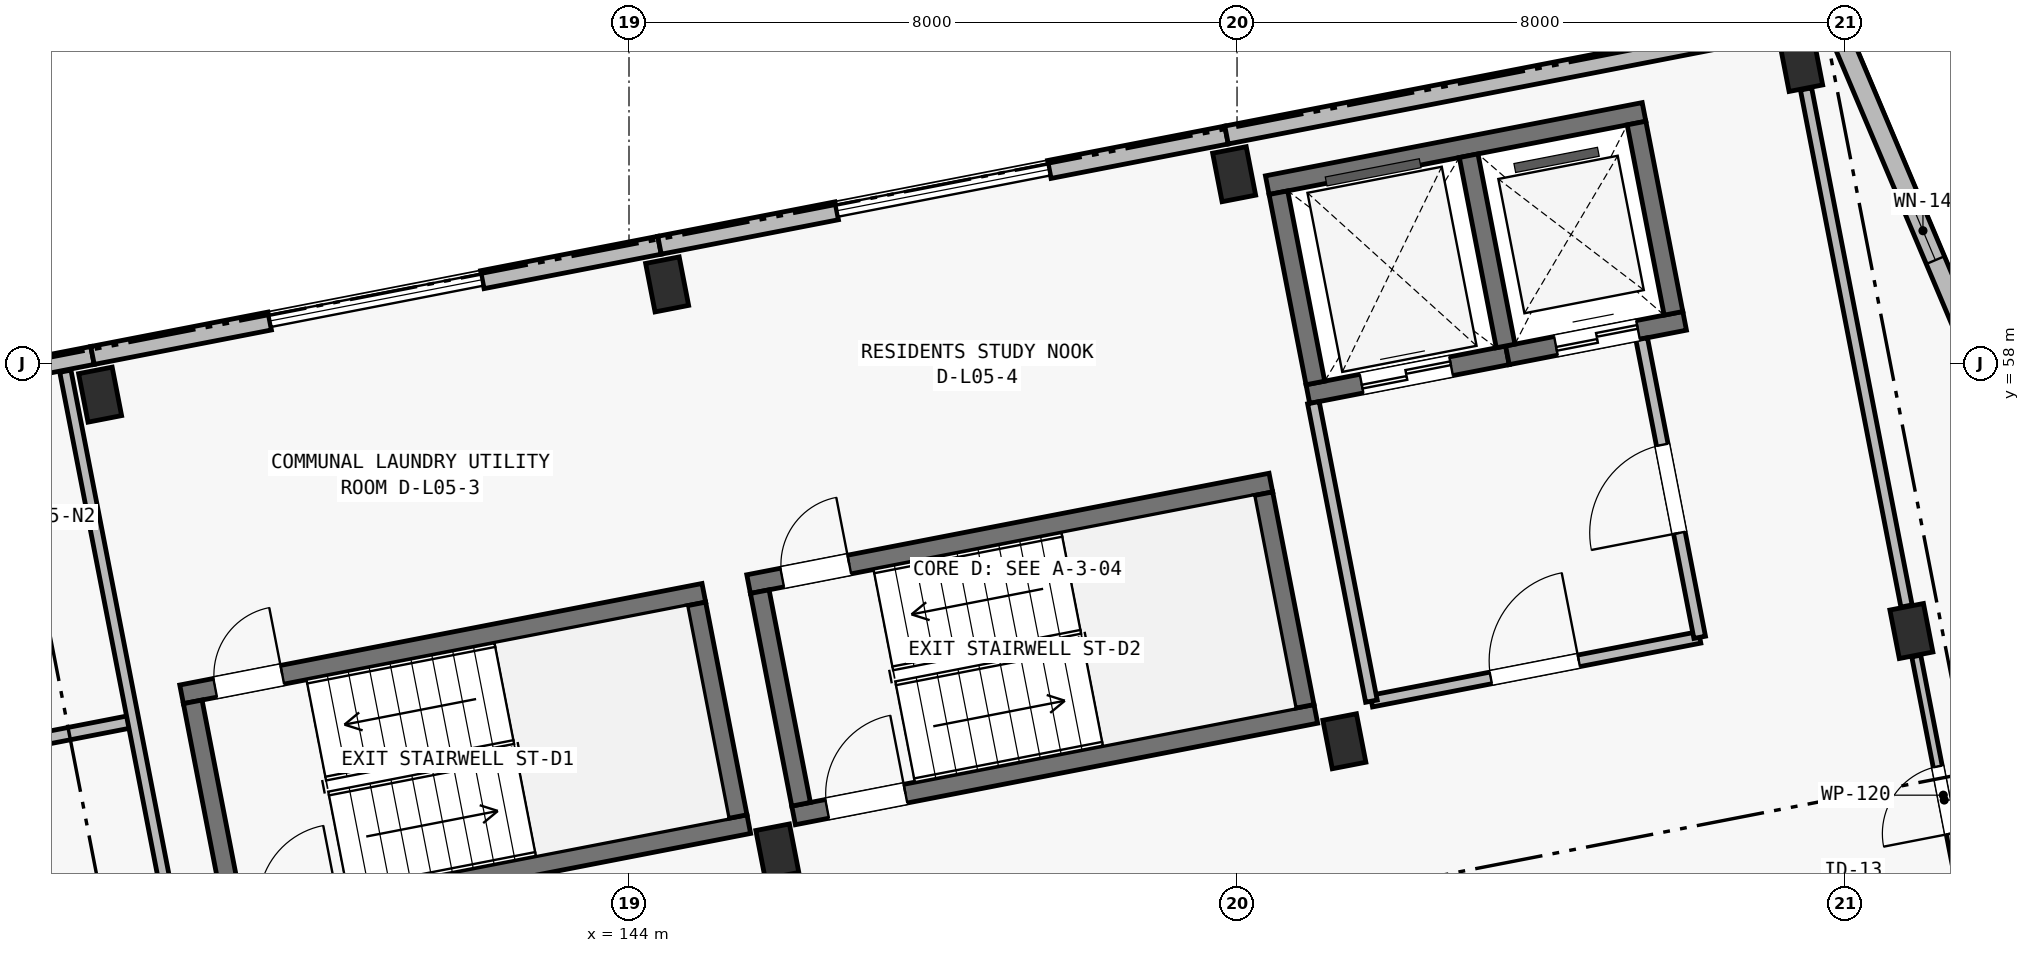
"""IFC4 building model, lengths in metres.
Left out: names, types, materials, properties, quantities, classifications, styles, units other than length and angle.
Written with IfcOpenShell. Run it as: python <this file> out.ifc"""

import sys

from ifc_helpers import new_model, si_unit, direction, frame, frame_2d, origin, origin_2d, place, context, subcontext, project, spatial, rectangle, extrude, element, fill, save


model = new_model("IFC4")
c1 = context("Model", 3, precision=1e-05, world=origin(), true_north=direction((0.0, 1.0)))
c2 = subcontext(c1, "Body", "Model", "MODEL_VIEW")
j1 = project(units=[si_unit("LENGTHUNIT", "METRE"), si_unit("PLANEANGLEUNIT", "RADIAN")], contexts=[c1])
p1 = place(None, origin())
s1 = spatial("IfcSite", under=j1, at=p1, CompositionType="ELEMENT")
p2 = place(p1, origin())
s2 = spatial("IfcBuilding", under=s1, at=p2, CompositionType="ELEMENT")
p3 = place(p2, frame((0.0, 0.0, 18.15)))
s3 = spatial("IfcBuildingStorey", under=s2, at=p3, CompositionType="ELEMENT", Elevation=18.15)
for number, where, z_axis, x_axis in (
    (1, (137.041, 57.59, 0.0), (0.0, 0.0, 1.0), (0.982, 0.191, 0.0)),
    (2, (145.952, 51.58, 0.0), (0.0, 0.0, 1.0), (0.982, 0.191, 0.0)),
    (3, (144.502, 59.041, 0.0), (0.0, 0.0, 1.0), (0.982, 0.191, 0.0)),
    (4, (153.412, 53.03, 0.0), (0.0, 0.0, 1.0), (0.982, 0.191, 0.0)),
    (5, (151.962, 60.491, 0.0), (0.0, 0.0, 1.0), (0.982, 0.191, 0.0)),
    (6, (160.873, 54.48, 0.0), (0.0, 0.0, 1.0), (0.982, 0.191, 0.0)),
    (7, (159.422, 61.941, 0.0), (0.0, 0.0, 1.0), (0.982, 0.191, 0.0)),
):
    element("IfcColumn", number, at=place(p3, frame(where, z_axis=z_axis, x_axis=x_axis)), inside=s3, PredefinedType="COLUMN", context=c2, shape_type="SweptSolid", body=[
        extrude(rectangle(XDim=0.45, YDim=0.65, at=origin_2d()), origin(), (0.0, 0.0, 1.0), 3.25),
    ])
p4 = place(p3, frame((152.397, 60.346, 0.0), z_axis=(0.0, 0.0, 1.0), x_axis=(0.981635261308, 0.190767433692, 0.0)))
e8 = element("IfcWall", 8, at=p4, inside=s3, PredefinedType="SHEAR", context=c2, shape_type="SweptSolid", body=[
    extrude(rectangle(XDim=5.05, YDim=0.25, at=frame_2d((2.525, 0.0))), origin(), (0.0, 0.0, 1.0), 3.25),
])
p5 = place(p3, frame((152.932, 57.598, 0.0), z_axis=(0.0, 0.0, 1.0), x_axis=(0.981636759622, 0.190759723627, 0.0)))
e9 = element("IfcWall", 9, at=p5, inside=s3, PredefinedType="SHEAR", context=c2, shape_type="SweptSolid", body=[
    extrude(rectangle(XDim=2.675, YDim=0.25, at=frame_2d((1.337, 0.0))), origin(), (0.0, 0.0, 1.0), 3.25),
])
p6 = place(p5, frame((0.72, 0.0, 0.0)))
e10 = element("IfcOpeningElement", 10, at=p6, cuts=e9, PredefinedType="OPENING", context=c2, shape_type="SweptSolid", body=[
    extrude(rectangle(XDim=1.2, YDim=2.2, at=frame_2d((0.6, 1.1))), frame((0.0, 0.14, 0.0), z_axis=(0.0, -1.0, 0.0), x_axis=(1.0, 0.0, 0.0)), (0.0, 0.0, 1.0), 0.28),
])
p7 = place(p3, frame((155.558, 58.108, 0.0), z_axis=(0.0, 0.0, 1.0), x_axis=(0.981633573872, 0.190776116556, 0.0)))
e11 = element("IfcWall", 11, at=p7, inside=s3, PredefinedType="SHEAR", context=c2, shape_type="SweptSolid", body=[
    extrude(rectangle(XDim=2.375, YDim=0.25, at=frame_2d((1.188, 0.0))), origin(), (0.0, 0.0, 1.0), 3.25),
])
p8 = place(p7, frame((0.65, 0.0, 0.0)))
e12 = element("IfcOpeningElement", 12, at=p8, cuts=e11, PredefinedType="OPENING", context=c2, shape_type="SweptSolid", body=[
    extrude(rectangle(XDim=1.1, YDim=2.15, at=frame_2d((0.55, 1.075))), frame((0.0, 0.14, 0.0), z_axis=(0.0, -1.0, 0.0), x_axis=(1.0, 0.0, 0.0)), (0.0, 0.0, 1.0), 0.28),
])
for number, where, z_axis, x_axis in (
    (13, (153.031, 57.744, 0.0), (0.0, 0.0, 1.0), (-0.191, 0.982, 0.0)),
    (14, (155.534, 58.231, 0.0), (0.0, 0.0, 1.0), (-0.191, 0.982, 0.0)),
    (15, (157.742, 58.66, 0.0), (0.0, 0.0, 1.0), (-0.191, 0.982, 0.0)),
):
    element("IfcWall", number, at=place(p3, frame(where, z_axis=z_axis, x_axis=x_axis)), inside=s3, PredefinedType="SHEAR", context=c2, shape_type="SweptSolid", body=[
        extrude(rectangle(XDim=2.55, YDim=0.25, at=frame_2d((1.275, 0.0))), origin(), (0.0, 0.0, 1.0), 3.25),
    ])
p9 = place(p3, frame((138.113, 53.647, 0.0), z_axis=(0.0, 0.0, 1.0), x_axis=(0.981626097708, 0.19081458094, 0.0)))
e16 = element("IfcWall", 16, at=p9, inside=s3, PredefinedType="SHEAR", context=c2, shape_type="SweptSolid", body=[
    extrude(rectangle(XDim=7.0, YDim=0.25, at=frame_2d((3.5, 0.0))), origin(), (0.0, 0.0, 1.0), 3.25),
])
p10 = place(p9, frame((0.45, 0.0, 0.0)))
e17 = element("IfcOpeningElement", 17, at=p10, cuts=e16, PredefinedType="OPENING", context=c2, shape_type="SweptSolid", body=[
    extrude(rectangle(XDim=0.9, YDim=2.1, at=frame_2d((0.45, 1.05))), frame((0.0, 0.14, 0.0), z_axis=(0.0, -1.0, 0.0), x_axis=(1.0, 0.0, 0.0)), (0.0, 0.0, 1.0), 0.28),
])
p11 = place(p3, frame((138.705, 50.604, 0.0), z_axis=(0.0, 0.0, 1.0), x_axis=(0.981626097708, 0.19081458094, 0.0)))
e18 = element("IfcWall", 18, at=p11, inside=s3, PredefinedType="SHEAR", context=c2, shape_type="SweptSolid", body=[
    extrude(rectangle(XDim=7.0, YDim=0.25, at=frame_2d((3.5, 0.0))), origin(), (0.0, 0.0, 1.0), 3.25),
])
p12 = place(p11, frame((0.45, 0.0, 0.0)))
e19 = element("IfcOpeningElement", 19, at=p12, cuts=e18, PredefinedType="OPENING", context=c2, shape_type="SweptSolid", body=[
    extrude(rectangle(XDim=1.05, YDim=2.15, at=frame_2d((0.525, 1.075))), frame((0.0, 0.14, 0.0), z_axis=(0.0, -1.0, 0.0), x_axis=(1.0, 0.0, 0.0)), (0.0, 0.0, 1.0), 0.28),
])
p13 = place(p3, frame((138.804, 50.751, 0.0), z_axis=(0.0, 0.0, 1.0), x_axis=(-0.190858194834, 0.981617618762, 0.0)))
e20 = element("IfcWall", 20, at=p13, inside=s3, PredefinedType="SHEAR", context=c2, shape_type="SweptSolid", body=[
    extrude(rectangle(XDim=2.85, YDim=0.25, at=frame_2d((1.425, 0.0))), origin(), (0.0, 0.0, 1.0), 3.25),
])
p14 = place(p3, frame((145.43, 52.039, 0.0), z_axis=(0.0, 0.0, 1.0), x_axis=(-0.190842147128, 0.981620738819, 0.0)))
e21 = element("IfcWall", 21, at=p14, inside=s3, PredefinedType="SHEAR", context=c2, shape_type="SweptSolid", body=[
    extrude(rectangle(XDim=2.85, YDim=0.25, at=frame_2d((1.425, 0.0))), origin(), (0.0, 0.0, 1.0), 3.25),
])
p15 = place(p3, frame((145.574, 55.098, 0.0), z_axis=(0.0, 0.0, 1.0), x_axis=(0.981626097708, 0.19081458094, 0.0)))
e22 = element("IfcWall", 22, at=p15, inside=s3, PredefinedType="SHEAR", context=c2, shape_type="SweptSolid", body=[
    extrude(rectangle(XDim=7.0, YDim=0.25, at=frame_2d((3.5, 0.0))), origin(), (0.0, 0.0, 1.0), 3.25),
])
p16 = place(p15, frame((0.45, 0.0, 0.0)))
e23 = element("IfcOpeningElement", 23, at=p16, cuts=e22, PredefinedType="OPENING", context=c2, shape_type="SweptSolid", body=[
    extrude(rectangle(XDim=0.9, YDim=2.1, at=frame_2d((0.45, 1.05))), frame((0.0, 0.14, 0.0), z_axis=(0.0, -1.0, 0.0), x_axis=(1.0, 0.0, 0.0)), (0.0, 0.0, 1.0), 0.28),
])
p17 = place(p3, frame((146.165, 52.054, 0.0), z_axis=(0.0, 0.0, 1.0), x_axis=(0.981627367538, 0.190808048312, 0.0)))
e24 = element("IfcWall", 24, at=p17, inside=s3, PredefinedType="SHEAR", context=c2, shape_type="SweptSolid", body=[
    extrude(rectangle(XDim=7.0, YDim=0.25, at=frame_2d((3.5, 0.0))), origin(), (0.0, 0.0, 1.0), 3.25),
])
p18 = place(p17, frame((0.45, 0.0, 0.0)))
e25 = element("IfcOpeningElement", 25, at=p18, cuts=e24, PredefinedType="OPENING", context=c2, shape_type="SweptSolid", body=[
    extrude(rectangle(XDim=1.05, YDim=2.15, at=frame_2d((0.525, 1.075))), frame((0.0, 0.14, 0.0), z_axis=(0.0, -1.0, 0.0), x_axis=(1.0, 0.0, 0.0)), (0.0, 0.0, 1.0), 0.28),
])
for number, where, z_axis, x_axis in (
    (26, (146.264, 52.201, 0.0), (0.0, 0.0, 1.0), (-0.191, 0.982, 0.0)),
    (27, (152.89, 53.489, 0.0), (0.0, 0.0, 1.0), (-0.191, 0.982, 0.0)),
):
    element("IfcWall", number, at=place(p3, frame(where, z_axis=z_axis, x_axis=x_axis)), inside=s3, PredefinedType="SHEAR", context=c2, shape_type="SweptSolid", body=[
        extrude(rectangle(XDim=2.85, YDim=0.25, at=frame_2d((1.425, 0.0))), origin(), (0.0, 0.0, 1.0), 3.25),
    ])
p19 = place(p3, frame((129.481, 56.656, 0.0), z_axis=(0.0, 0.0, 1.0), x_axis=(0.981626422232, 0.190812911449, 0.0)))
e28 = element("IfcWall", 28, at=p19, inside=s3, PredefinedType="SOLIDWALL", context=c2, shape_type="SweptSolid", body=[
    extrude(rectangle(XDim=7.6, YDim=0.24, at=frame_2d((3.8, 0.0))), origin(), (0.0, 0.0, 1.0), 3.0),
])
p20 = place(p19, frame((0.934, 0.0, 0.5)))
e29 = element("IfcOpeningElement", 29, at=p20, cuts=e28, PredefinedType="OPENING", context=c2, shape_type="SweptSolid", body=[
    extrude(rectangle(XDim=0.62, YDim=2.28, at=frame_2d((0.31, 1.14))), frame((0.0, 0.135, 0.0), z_axis=(0.0, -1.0, 0.0), x_axis=(1.0, 0.0, 0.0)), (0.0, 0.0, 1.0), 0.27),
])
p21 = place(p19, frame((5.506, 0.0, 0.44)))
e30 = element("IfcOpeningElement", 30, at=p21, cuts=e28, PredefinedType="OPENING", context=c2, shape_type="SweptSolid", body=[
    extrude(rectangle(XDim=0.7, YDim=2.36, at=frame_2d((0.35, 1.18))), frame((0.0, 0.135, 0.0), z_axis=(0.0, -1.0, 0.0), x_axis=(1.0, 0.0, 0.0)), (0.0, 0.0, 1.0), 0.27),
])
for number, where, z_axis, x_axis in (
    (31, (136.941, 58.106, 0.0), (0.0, 0.0, 1.0), (0.982, 0.191, 0.0)),
    (32, (142.07, 59.103, 0.0), (0.0, 0.0, 1.0), (0.982, 0.191, 0.0)),
):
    element("IfcWall", number, at=place(p3, frame(where, z_axis=z_axis, x_axis=x_axis)), inside=s3, PredefinedType="SOLIDWALL", context=c2, shape_type="SweptSolid", body=[
        extrude(rectangle(XDim=2.375, YDim=0.24, at=frame_2d((1.188, 0.0))), origin(), (0.0, 0.0, 1.0), 3.0),
    ])
p22 = place(p3, frame((144.401, 59.556, 0.0), z_axis=(0.0, 0.0, 1.0), x_axis=(0.981633573872, 0.190776116556, 0.0)))
e33 = element("IfcWall", 33, at=p22, inside=s3, PredefinedType="SOLIDWALL", context=c2, shape_type="SweptSolid", body=[
    extrude(rectangle(XDim=2.375, YDim=0.24, at=frame_2d((1.188, 0.0))), origin(), (0.0, 0.0, 1.0), 3.0),
])
p23 = place(p3, frame((149.531, 60.553, 0.0), z_axis=(0.0, 0.0, 1.0), x_axis=(0.98161057432, 0.190894422087, 0.0)))
e34 = element("IfcWall", 34, at=p23, inside=s3, PredefinedType="SOLIDWALL", context=c2, shape_type="SweptSolid", body=[
    extrude(rectangle(XDim=2.375, YDim=0.24, at=frame_2d((1.188, 0.0))), origin(), (0.0, 0.0, 1.0), 3.0),
])
p24 = place(p3, frame((151.862, 61.006, 0.0), z_axis=(0.0, 0.0, 1.0), x_axis=(0.981627273155, 0.190808533872, 0.0)))
e35 = element("IfcWall", 35, at=p24, inside=s3, PredefinedType="SOLIDWALL", context=c2, shape_type="SweptSolid", body=[
    extrude(rectangle(XDim=8.125, YDim=0.24, at=frame_2d((4.062, 0.0))), origin(), (0.0, 0.0, 1.0), 3.0),
])
p25 = place(p3, frame((159.837, 62.556, 0.0), z_axis=(0.0, 0.0, 1.0), x_axis=(0.389225507936, -0.921142499276, 0.0)))
e36 = element("IfcWall", 36, at=p25, inside=s3, PredefinedType="SOLIDWALL", context=c2, shape_type="SweptSolid", body=[
    extrude(rectangle(XDim=17.91, YDim=0.26, at=frame_2d((8.955, 0.0))), origin(), (0.0, 0.0, 1.0), 3.0),
])
p26 = place(p25, frame((2.63, 0.0, 0.52)))
e37 = element("IfcOpeningElement", 37, at=p26, cuts=e36, PredefinedType="OPENING", context=c2, shape_type="SweptSolid", body=[
    extrude(rectangle(XDim=0.84, YDim=2.28, at=frame_2d((0.42, 1.14))), frame((0.0, 0.145, 0.0), z_axis=(0.0, -1.0, 0.0), x_axis=(1.0, 0.0, 0.0)), (0.0, 0.0, 1.0), 0.29),
])
p27 = place(p25, frame((14.24, 0.0, 0.45)))
e38 = element("IfcOpeningElement", 38, at=p27, cuts=e36, PredefinedType="OPENING", context=c2, shape_type="SweptSolid", body=[
    extrude(rectangle(XDim=0.68, YDim=2.24, at=frame_2d((0.34, 1.12))), frame((0.0, 0.145, 0.0), z_axis=(0.0, -1.0, 0.0), x_axis=(1.0, 0.0, 0.0)), (0.0, 0.0, 1.0), 0.29),
])
p28 = place(p3, frame((153.768, 53.558, 0.0), z_axis=(0.0, 0.0, 1.0), x_axis=(0.981624918225, 0.190820648566, 0.0)))
e39 = element("IfcWall", 39, at=p28, inside=s3, PredefinedType="PARTITIONING", context=c2, shape_type="SweptSolid", body=[
    extrude(rectangle(XDim=4.4, YDim=0.155, at=frame_2d((2.2, 0.0))), origin(), (0.0, 0.0, 1.0), 2.97),
])
p29 = place(p28, frame((1.6, 0.0, 0.0)))
e40 = element("IfcOpeningElement", 40, at=p29, cuts=e39, PredefinedType="OPENING", context=c2, shape_type="SweptSolid", body=[
    extrude(rectangle(XDim=1.18, YDim=2.15, at=frame_2d((0.59, 1.075))), frame((0.0, 0.093, 0.0), z_axis=(0.0, -1.0, 0.0), x_axis=(1.0, 0.0, 0.0)), (0.0, 0.0, 1.0), 0.185),
])
p30 = place(p3, frame((153.768, 53.558, 0.0), z_axis=(0.0, 0.0, 1.0), x_axis=(-0.19085495634, 0.981618248425, 0.0)))
e41 = element("IfcWall", 41, at=p30, inside=s3, PredefinedType="PARTITIONING", context=c2, shape_type="SweptSolid", body=[
    extrude(rectangle(XDim=4.0, YDim=0.155, at=frame_2d((2.0, 0.0))), origin(), (0.0, 0.0, 1.0), 2.97),
])
p31 = place(p3, frame((158.087, 54.397, 0.0), z_axis=(0.0, 0.0, 1.0), x_axis=(-0.190796144009, 0.981629681413, 0.0)))
e42 = element("IfcWall", 42, at=p31, inside=s3, PredefinedType="PARTITIONING", context=c2, shape_type="SweptSolid", body=[
    extrude(rectangle(XDim=4.0, YDim=0.155, at=frame_2d((2.0, 0.0))), origin(), (0.0, 0.0, 1.0), 2.97),
])
p32 = place(p31, frame((1.4, 0.0, 0.0)))
e43 = element("IfcOpeningElement", 43, at=p32, cuts=e42, PredefinedType="OPENING", context=c2, shape_type="SweptSolid", body=[
    extrude(rectangle(XDim=1.18, YDim=2.15, at=frame_2d((0.59, 1.075))), frame((0.0, 0.093, 0.0), z_axis=(0.0, -1.0, 0.0), x_axis=(1.0, 0.0, 0.0)), (0.0, 0.0, 1.0), 0.185),
])
p33 = place(p3, frame((161.648, 50.49, 0.0), z_axis=(0.0, 0.0, 1.0), x_axis=(-0.190789073686, 0.981631055622, 0.0)))
e44 = element("IfcWall", 44, at=p33, inside=s3, PredefinedType="PARTITIONING", context=c2, shape_type="SweptSolid", body=[
    extrude(rectangle(XDim=3.73, YDim=0.12, at=frame_2d((1.865, 0.0))), origin(), (0.0, 0.0, 1.0), 2.5),
])
p34 = place(p33, frame((1.35, 0.0, 0.0)))
e45 = element("IfcOpeningElement", 45, at=p34, cuts=e44, PredefinedType="OPENING", context=c2, shape_type="SweptSolid", body=[
    extrude(rectangle(XDim=0.9, YDim=2.1, at=frame_2d((0.45, 1.05))), frame((0.0, 0.075, 0.0), z_axis=(0.0, -1.0, 0.0), x_axis=(1.0, 0.0, 0.0)), (0.0, 0.0, 1.0), 0.15),
])
p35 = place(p3, frame((160.809, 54.809, 0.0), z_axis=(0.0, 0.0, 1.0), x_axis=(-0.190808365525, 0.981627305878, 0.0)))
e46 = element("IfcWall", 46, at=p35, inside=s3, PredefinedType="PARTITIONING", context=c2, shape_type="SweptSolid", body=[
    extrude(rectangle(XDim=6.93, YDim=0.15, at=frame_2d((3.465, 0.0))), origin(), (0.0, 0.0, 1.0), 2.5),
])
p36 = place(p3, frame((134.132, 52.644, 0.0), z_axis=(0.0, 0.0, 1.0), x_axis=(0.981629173664, 0.190798756314, 0.0)))
e47 = element("IfcWall", 47, at=p36, inside=s3, PredefinedType="PLUMBINGWALL", context=c2, shape_type="SweptSolid", body=[
    extrude(rectangle(XDim=3.41, YDim=0.165, at=frame_2d((1.705, 0.0))), origin(), (0.0, 0.0, 1.0), 2.97),
])
p37 = place(p36, frame((1.295, 0.0, 0.0)))
e48 = element("IfcOpeningElement", 48, at=p37, cuts=e47, PredefinedType="OPENING", context=c2, shape_type="SweptSolid", body=[
    extrude(rectangle(XDim=0.82, YDim=2.08, at=frame_2d((0.41, 1.04))), frame((0.0, 0.097, 0.0), z_axis=(0.0, -1.0, 0.0), x_axis=(1.0, 0.0, 0.0)), (0.0, 0.0, 1.0), 0.195),
])
p38 = place(p3, frame((138.467, 48.21, 0.0), z_axis=(0.0, 0.0, 1.0), x_axis=(-0.190814044018, 0.981626202078, 0.0)))
e49 = element("IfcWall", 49, at=p38, inside=s3, PredefinedType="PARTITIONING", context=c2, shape_type="SweptSolid", body=[
    extrude(rectangle(XDim=9.87, YDim=0.15, at=frame_2d((4.935, 0.0))), origin(), (0.0, 0.0, 1.0), 2.97),
])
p39 = place(p26, origin())
e50 = element("IfcWindow", 50, at=p39, inside=s3, PartitioningType="SINGLE_PANEL", PredefinedType="WINDOW", context=c2, shape_type="SweptSolid", body=[
    extrude(rectangle(XDim=0.84, YDim=2.28, at=frame_2d((0.42, 1.14))), frame((0.0, 0.03, 0.0), z_axis=(0.0, -1.0, 0.0), x_axis=(1.0, 0.0, 0.0)), (0.0, 0.0, 1.0), 0.06),
])
fill(e37, e50)
p40 = place(p29, origin())
e51 = element("IfcDoor", 51, at=p40, inside=s3, OperationType="SINGLE_SWING_RIGHT", PredefinedType="DOOR", context=c2, shape_type="SweptSolid", body=[
    extrude(rectangle(XDim=1.18, YDim=2.15, at=frame_2d((0.59, 1.075))), frame((0.0, 0.025, 0.0), z_axis=(0.0, -1.0, 0.0), x_axis=(1.0, 0.0, 0.0)), (0.0, 0.0, 1.0), 0.05),
])
fill(e40, e51)
p41 = place(p32, origin())
e52 = element("IfcDoor", 52, at=p41, inside=s3, OperationType="SINGLE_SWING_LEFT", PredefinedType="DOOR", context=c2, shape_type="SweptSolid", body=[
    extrude(rectangle(XDim=1.18, YDim=2.15, at=frame_2d((0.59, 1.075))), frame((0.0, 0.025, 0.0), z_axis=(0.0, -1.0, 0.0), x_axis=(1.0, 0.0, 0.0)), (0.0, 0.0, 1.0), 0.05),
])
fill(e43, e52)
p42 = place(p34, origin())
e53 = element("IfcDoor", 53, at=p42, inside=s3, OperationType="SINGLE_SWING_LEFT", PredefinedType="DOOR", context=c2, shape_type="SweptSolid", body=[
    extrude(rectangle(XDim=0.9, YDim=2.1, at=frame_2d((0.45, 1.05))), frame((0.0, 0.025, 0.0), z_axis=(0.0, -1.0, 0.0), x_axis=(1.0, 0.0, 0.0)), (0.0, 0.0, 1.0), 0.05),
])
fill(e45, e53)
p43 = place(p10, origin())
e54 = element("IfcDoor", 54, at=p43, inside=s3, OperationType="SINGLE_SWING_RIGHT", PredefinedType="DOOR", context=c2, shape_type="SweptSolid", body=[
    extrude(rectangle(XDim=0.9, YDim=2.1, at=frame_2d((0.45, 1.05))), frame((0.0, 0.025, 0.0), z_axis=(0.0, -1.0, 0.0), x_axis=(1.0, 0.0, 0.0)), (0.0, 0.0, 1.0), 0.05),
])
fill(e17, e54)
p44 = place(p18, origin())
e55 = element("IfcDoor", 55, at=p44, inside=s3, OperationType="SINGLE_SWING_RIGHT", PredefinedType="DOOR", context=c2, shape_type="SweptSolid", body=[
    extrude(rectangle(XDim=1.05, YDim=2.15, at=frame_2d((0.525, 1.075))), frame((0.0, 0.025, 0.0), z_axis=(0.0, -1.0, 0.0), x_axis=(1.0, 0.0, 0.0)), (0.0, 0.0, 1.0), 0.05),
])
fill(e25, e55)
p45 = place(p16, origin())
e56 = element("IfcDoor", 56, at=p45, inside=s3, OperationType="SINGLE_SWING_RIGHT", PredefinedType="DOOR", context=c2, shape_type="SweptSolid", body=[
    extrude(rectangle(XDim=0.9, YDim=2.1, at=frame_2d((0.45, 1.05))), frame((0.0, 0.025, 0.0), z_axis=(0.0, -1.0, 0.0), x_axis=(1.0, 0.0, 0.0)), (0.0, 0.0, 1.0), 0.05),
])
fill(e23, e56)
p46 = place(p6, origin())
e57 = element("IfcDoor", 57, at=p46, inside=s3, OperationType="DOUBLE_DOOR_SLIDING", PredefinedType="DOOR", context=c2, shape_type="SweptSolid", body=[
    extrude(rectangle(XDim=1.2, YDim=2.2, at=frame_2d((0.6, 1.1))), frame((0.0, 0.025, 0.0), z_axis=(0.0, -1.0, 0.0), x_axis=(1.0, 0.0, 0.0)), (0.0, 0.0, 1.0), 0.05),
])
fill(e10, e57)
p47 = place(p8, origin())
e58 = element("IfcDoor", 58, at=p47, inside=s3, OperationType="DOUBLE_DOOR_SLIDING", PredefinedType="DOOR", context=c2, shape_type="SweptSolid", body=[
    extrude(rectangle(XDim=1.1, YDim=2.15, at=frame_2d((0.55, 1.075))), frame((0.0, 0.025, 0.0), z_axis=(0.0, -1.0, 0.0), x_axis=(1.0, 0.0, 0.0)), (0.0, 0.0, 1.0), 0.05),
])
fill(e12, e58)
save(model, sys.argv[1])
